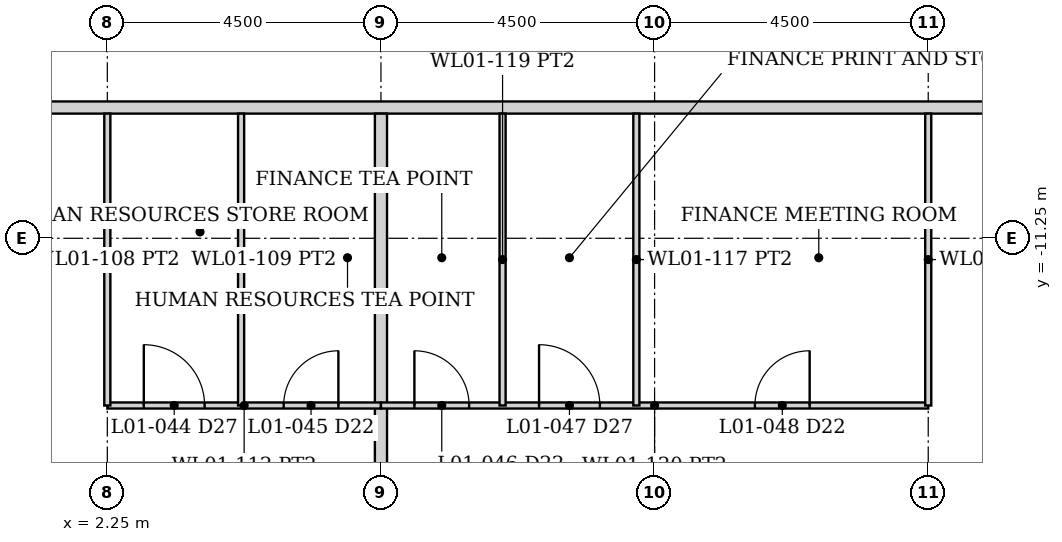
"""IFC4 building model, lengths in metres.
Left out: names, types, materials, properties, quantities, classifications, styles, units other than length and angle.
Written with IfcOpenShell. Run it as: python <this file> out.ifc"""

import sys

from ifc_helpers import new_model, si_unit, direction, frame, frame_2d, origin, place, context, subcontext, project, spatial, rectangle, extrude, element, fill, save


model = new_model("IFC4")
c1 = context("Model", 3, precision=1e-05, world=origin(), true_north=direction((0.0, 1.0)))
c2 = subcontext(c1, "Body", "Model", "MODEL_VIEW")
j1 = project(units=[si_unit("LENGTHUNIT", "METRE"), si_unit("PLANEANGLEUNIT", "RADIAN")], contexts=[c1])
p1 = place(None, origin())
s1 = spatial("IfcSite", under=j1, at=p1, CompositionType="ELEMENT")
p2 = place(p1, origin())
s2 = spatial("IfcBuilding", under=s1, at=p2, CompositionType="ELEMENT")
p3 = place(p2, frame((0.0, 0.0, 6.0)))
s3 = spatial("IfcBuildingStorey", under=s2, at=p3, CompositionType="ELEMENT", Elevation=6.0)
p4 = place(p3, frame((-25.075, -9.1, 0.0), z_axis=(0.0, 0.0, 1.0), x_axis=(1.0, 0.0, 0.0)))
e1 = element("IfcWall", 1, at=p4, inside=s3, PredefinedType="PARTITIONING", context=c2, shape_type="SweptSolid", body=[
    extrude(rectangle(XDim=50.15, YDim=0.2, at=frame_2d((25.075, 0.0))), origin(), (0.0, 0.0, 1.0), 3.829),
])
p5 = place(p4, frame((6.85, 0.0, 0.0)))
e2 = element("IfcOpeningElement", 2, at=p5, cuts=e1, PredefinedType="OPENING", context=c2, shape_type="SweptSolid", body=[
    extrude(rectangle(XDim=0.9, YDim=2.1, at=frame_2d((0.45, 1.05))), frame((0.0, 0.11, 0.0), z_axis=(0.0, -1.0, 0.0), x_axis=(1.0, 0.0, 0.0)), (0.0, 0.0, 1.0), 0.22),
])
p6 = place(p4, frame((24.625, 0.0, 0.0)))
e3 = element("IfcOpeningElement", 3, at=p6, cuts=e1, PredefinedType="OPENING", context=c2, shape_type="SweptSolid", body=[
    extrude(rectangle(XDim=0.9, YDim=2.1, at=frame_2d((0.45, 1.05))), frame((0.0, 0.11, 0.0), z_axis=(0.0, -1.0, 0.0), x_axis=(1.0, 0.0, 0.0)), (0.0, 0.0, 1.0), 0.22),
])
p7 = place(p4, frame((42.4, 0.0, 0.0)))
e4 = element("IfcOpeningElement", 4, at=p7, cuts=e1, PredefinedType="OPENING", context=c2, shape_type="SweptSolid", body=[
    extrude(rectangle(XDim=0.9, YDim=2.1, at=frame_2d((0.45, 1.05))), frame((0.0, 0.11, 0.0), z_axis=(0.0, -1.0, 0.0), x_axis=(1.0, 0.0, 0.0)), (0.0, 0.0, 1.0), 0.22),
])
p8 = place(p3, frame((6.75, -29.089, 0.0), z_axis=(0.0, 0.0, 1.0), x_axis=(0.0, 1.0, 0.0)))
e5 = element("IfcWall", 5, at=p8, inside=s3, PredefinedType="PARTITIONING", context=c2, shape_type="SweptSolid", body=[
    extrude(rectangle(XDim=19.889, YDim=0.2, at=frame_2d((9.944, 0.0))), origin(), (0.0, 0.0, 1.0), 3.829),
])
p9 = place(p3, frame((2.25, -14.0, 0.0), z_axis=(0.0, 0.0, 1.0), x_axis=(1.0, 0.0, 0.0)))
e6 = element("IfcWall", 6, at=p9, inside=s3, PredefinedType="PARTITIONING", context=c2, shape_type="SweptSolid", body=[
    extrude(rectangle(XDim=4.5, YDim=0.1, at=frame_2d((2.25, 0.0))), origin(), (0.0, 0.0, 1.0), 3.829),
])
p10 = place(p9, frame((0.6, 0.0, 0.0)))
e7 = element("IfcOpeningElement", 7, at=p10, cuts=e6, PredefinedType="OPENING", context=c2, shape_type="SweptSolid", body=[
    extrude(rectangle(XDim=1.0, YDim=2.1, at=frame_2d((0.5, 1.05))), frame((0.0, 0.06, 0.0), z_axis=(0.0, -1.0, 0.0), x_axis=(1.0, 0.0, 0.0)), (0.0, 0.0, 1.0), 0.12),
])
p11 = place(p9, frame((2.9, 0.0, 0.0)))
e8 = element("IfcOpeningElement", 8, at=p11, cuts=e6, PredefinedType="OPENING", context=c2, shape_type="SweptSolid", body=[
    extrude(rectangle(XDim=0.9, YDim=2.1, at=frame_2d((0.45, 1.05))), frame((0.0, 0.06, 0.0), z_axis=(0.0, -1.0, 0.0), x_axis=(1.0, 0.0, 0.0)), (0.0, 0.0, 1.0), 0.12),
])
for number, where, z_axis, x_axis in (
    (9, (2.25, -14.0, 0.0), (0.0, 0.0, 1.0), (0.0, 1.0, 0.0)),
    (10, (4.45, -14.0, 0.0), (0.0, 0.0, 1.0), (0.0, 1.0, 0.0)),
):
    element("IfcWall", number, at=place(p3, frame(where, z_axis=z_axis, x_axis=x_axis)), inside=s3, PredefinedType="PARTITIONING", context=c2, shape_type="SweptSolid", body=[
        extrude(rectangle(XDim=4.8, YDim=0.1, at=frame_2d((2.4, 0.0))), origin(), (0.0, 0.0, 1.0), 3.829),
    ])
p12 = place(p3, frame((6.75, -14.0, 0.0), z_axis=(0.0, 0.0, 1.0), x_axis=(1.0, 0.0, 0.0)))
e11 = element("IfcWall", 11, at=p12, inside=s3, PredefinedType="PARTITIONING", context=c2, shape_type="SweptSolid", body=[
    extrude(rectangle(XDim=9.0, YDim=0.1, at=frame_2d((4.5, 0.0))), origin(), (0.0, 0.0, 1.0), 3.829),
])
p13 = place(p12, frame((6.15, 0.0, 0.0)))
e12 = element("IfcOpeningElement", 12, at=p13, cuts=e11, PredefinedType="OPENING", context=c2, shape_type="SweptSolid", body=[
    extrude(rectangle(XDim=0.9, YDim=2.1, at=frame_2d((0.45, 1.05))), frame((0.0, 0.06, 0.0), z_axis=(0.0, -1.0, 0.0), x_axis=(1.0, 0.0, 0.0)), (0.0, 0.0, 1.0), 0.12),
])
p14 = place(p12, frame((2.6, 0.0, 0.0)))
e13 = element("IfcOpeningElement", 13, at=p14, cuts=e11, PredefinedType="OPENING", context=c2, shape_type="SweptSolid", body=[
    extrude(rectangle(XDim=1.0, YDim=2.1, at=frame_2d((0.5, 1.05))), frame((0.0, 0.06, 0.0), z_axis=(0.0, -1.0, 0.0), x_axis=(1.0, 0.0, 0.0)), (0.0, 0.0, 1.0), 0.12),
])
p15 = place(p12, frame((0.55, 0.0, 0.0)))
e14 = element("IfcOpeningElement", 14, at=p15, cuts=e11, PredefinedType="OPENING", context=c2, shape_type="SweptSolid", body=[
    extrude(rectangle(XDim=0.9, YDim=2.1, at=frame_2d((0.45, 1.05))), frame((0.0, 0.06, 0.0), z_axis=(0.0, -1.0, 0.0), x_axis=(1.0, 0.0, 0.0)), (0.0, 0.0, 1.0), 0.12),
])
for number, where, z_axis, x_axis in (
    (15, (8.75, -14.0, 0.0), (0.0, 0.0, 1.0), (0.0, 1.0, 0.0)),
    (16, (10.95, -14.0, 0.0), (0.0, 0.0, 1.0), (0.0, 1.0, 0.0)),
    (17, (15.75, -14.0, 0.0), (0.0, 0.0, 1.0), (0.0, 1.0, 0.0)),
):
    element("IfcWall", number, at=place(p3, frame(where, z_axis=z_axis, x_axis=x_axis)), inside=s3, PredefinedType="PARTITIONING", context=c2, shape_type="SweptSolid", body=[
        extrude(rectangle(XDim=4.8, YDim=0.1, at=frame_2d((2.4, 0.0))), origin(), (0.0, 0.0, 1.0), 3.829),
    ])
p16 = place(p10, origin())
e18 = element("IfcDoor", 18, at=p16, inside=s3, OperationType="SINGLE_SWING_LEFT", PredefinedType="DOOR", context=c2, shape_type="SweptSolid", body=[
    extrude(rectangle(XDim=1.0, YDim=2.1, at=frame_2d((0.5, 1.05))), frame((0.0, 0.025, 0.0), z_axis=(0.0, -1.0, 0.0), x_axis=(1.0, 0.0, 0.0)), (0.0, 0.0, 1.0), 0.05),
])
fill(e7, e18)
p17 = place(p11, origin())
e19 = element("IfcDoor", 19, at=p17, inside=s3, OperationType="SINGLE_SWING_RIGHT", PredefinedType="DOOR", context=c2, shape_type="SweptSolid", body=[
    extrude(rectangle(XDim=0.9, YDim=2.1, at=frame_2d((0.45, 1.05))), frame((0.0, 0.025, 0.0), z_axis=(0.0, -1.0, 0.0), x_axis=(1.0, 0.0, 0.0)), (0.0, 0.0, 1.0), 0.05),
])
fill(e8, e19)
p18 = place(p13, origin())
e20 = element("IfcDoor", 20, at=p18, inside=s3, OperationType="SINGLE_SWING_RIGHT", PredefinedType="DOOR", context=c2, shape_type="SweptSolid", body=[
    extrude(rectangle(XDim=0.9, YDim=2.1, at=frame_2d((0.45, 1.05))), frame((0.0, 0.025, 0.0), z_axis=(0.0, -1.0, 0.0), x_axis=(1.0, 0.0, 0.0)), (0.0, 0.0, 1.0), 0.05),
])
fill(e12, e20)
p19 = place(p14, origin())
e21 = element("IfcDoor", 21, at=p19, inside=s3, OperationType="SINGLE_SWING_LEFT", PredefinedType="DOOR", context=c2, shape_type="SweptSolid", body=[
    extrude(rectangle(XDim=1.0, YDim=2.1, at=frame_2d((0.5, 1.05))), frame((0.0, 0.025, 0.0), z_axis=(0.0, -1.0, 0.0), x_axis=(1.0, 0.0, 0.0)), (0.0, 0.0, 1.0), 0.05),
])
fill(e13, e21)
p20 = place(p15, origin())
e22 = element("IfcDoor", 22, at=p20, inside=s3, OperationType="SINGLE_SWING_LEFT", PredefinedType="DOOR", context=c2, shape_type="SweptSolid", body=[
    extrude(rectangle(XDim=0.9, YDim=2.1, at=frame_2d((0.45, 1.05))), frame((0.0, 0.025, 0.0), z_axis=(0.0, -1.0, 0.0), x_axis=(1.0, 0.0, 0.0)), (0.0, 0.0, 1.0), 0.05),
])
fill(e14, e22)
save(model, sys.argv[1])
